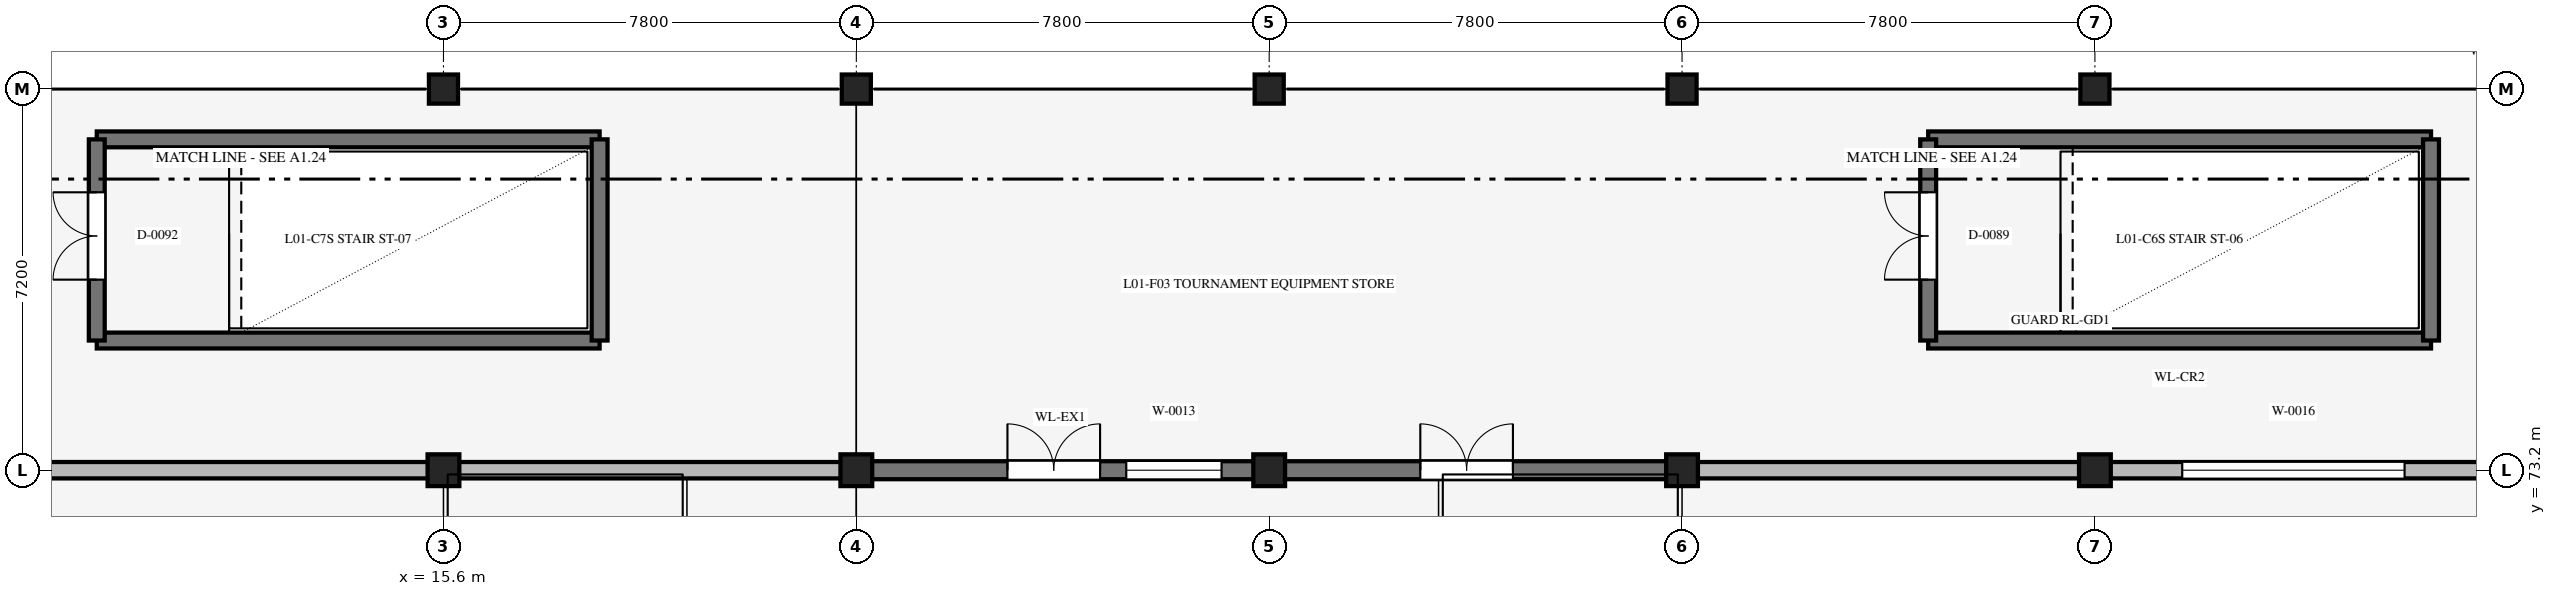
"""IFC4 building model, lengths in metres.
Left out: names, types, materials, properties, quantities, classifications, styles, units other than length and angle.
Written with IfcOpenShell. Run it as: python <this file> out.ifc"""

import sys

from ifc_helpers import new_model, si_unit, direction, frame, frame_2d, origin, origin_2d, place, context, subcontext, project, spatial, rectangle, extrude, element, fill, save


model = new_model("IFC4")
c1 = context("Model", 3, precision=1e-05, world=origin(), true_north=direction((0.0, 1.0)))
c2 = subcontext(c1, "Body", "Model", "MODEL_VIEW")
j1 = project(units=[si_unit("LENGTHUNIT", "METRE"), si_unit("PLANEANGLEUNIT", "RADIAN")], contexts=[c1])
p1 = place(None, origin())
s1 = spatial("IfcSite", under=j1, at=p1, CompositionType="ELEMENT")
p2 = place(p1, origin())
s2 = spatial("IfcBuilding", under=s1, at=p2, CompositionType="ELEMENT")
p3 = place(p2, frame((0.0, 0.0, 6.0)))
s3 = spatial("IfcBuildingStorey", under=s2, at=p3, CompositionType="ELEMENT", Elevation=6.0)
p4 = place(p3, frame((15.6, 73.2, 0.0), z_axis=(0.0, 0.0, 1.0), x_axis=(1.0, 0.0, 0.0)))
e1 = element("IfcColumn", 1, at=p4, inside=s3, PredefinedType="COLUMN", context=c2, shape_type="SweptSolid", body=[
    extrude(rectangle(XDim=0.6, YDim=0.6, at=origin_2d()), origin(), (0.0, 0.0, 1.0), 6.0),
])
p5 = place(p3, frame((15.6, 80.4, 0.0), z_axis=(0.0, 0.0, 1.0), x_axis=(1.0, 0.0, 0.0)))
e2 = element("IfcColumn", 2, at=p5, inside=s3, PredefinedType="COLUMN", context=c2, shape_type="SweptSolid", body=[
    extrude(rectangle(XDim=0.55, YDim=0.55, at=origin_2d()), origin(), (0.0, 0.0, 1.0), 6.0),
])
p6 = place(p3, frame((23.4, 73.2, 0.0), z_axis=(0.0, 0.0, 1.0), x_axis=(1.0, 0.0, 0.0)))
e3 = element("IfcColumn", 3, at=p6, inside=s3, PredefinedType="COLUMN", context=c2, shape_type="SweptSolid", body=[
    extrude(rectangle(XDim=0.6, YDim=0.6, at=origin_2d()), origin(), (0.0, 0.0, 1.0), 6.0),
])
p7 = place(p3, frame((23.4, 80.4, 0.0), z_axis=(0.0, 0.0, 1.0), x_axis=(1.0, 0.0, 0.0)))
e4 = element("IfcColumn", 4, at=p7, inside=s3, PredefinedType="COLUMN", context=c2, shape_type="SweptSolid", body=[
    extrude(rectangle(XDim=0.55, YDim=0.55, at=origin_2d()), origin(), (0.0, 0.0, 1.0), 6.0),
])
p8 = place(p3, frame((31.2, 73.2, 0.0), z_axis=(0.0, 0.0, 1.0), x_axis=(1.0, 0.0, 0.0)))
e5 = element("IfcColumn", 5, at=p8, inside=s3, PredefinedType="COLUMN", context=c2, shape_type="SweptSolid", body=[
    extrude(rectangle(XDim=0.6, YDim=0.6, at=origin_2d()), origin(), (0.0, 0.0, 1.0), 6.0),
])
p9 = place(p3, frame((31.2, 80.4, 0.0), z_axis=(0.0, 0.0, 1.0), x_axis=(1.0, 0.0, 0.0)))
e6 = element("IfcColumn", 6, at=p9, inside=s3, PredefinedType="COLUMN", context=c2, shape_type="SweptSolid", body=[
    extrude(rectangle(XDim=0.55, YDim=0.55, at=origin_2d()), origin(), (0.0, 0.0, 1.0), 6.0),
])
p10 = place(p3, frame((39.0, 73.2, 0.0), z_axis=(0.0, 0.0, 1.0), x_axis=(1.0, 0.0, 0.0)))
e7 = element("IfcColumn", 7, at=p10, inside=s3, PredefinedType="COLUMN", context=c2, shape_type="SweptSolid", body=[
    extrude(rectangle(XDim=0.6, YDim=0.6, at=origin_2d()), origin(), (0.0, 0.0, 1.0), 6.0),
])
p11 = place(p3, frame((39.0, 80.4, 0.0), z_axis=(0.0, 0.0, 1.0), x_axis=(1.0, 0.0, 0.0)))
e8 = element("IfcColumn", 8, at=p11, inside=s3, PredefinedType="COLUMN", context=c2, shape_type="SweptSolid", body=[
    extrude(rectangle(XDim=0.55, YDim=0.55, at=origin_2d()), origin(), (0.0, 0.0, 1.0), 6.0),
])
p12 = place(p3, frame((46.8, 73.2, 0.0), z_axis=(0.0, 0.0, 1.0), x_axis=(1.0, 0.0, 0.0)))
e9 = element("IfcColumn", 9, at=p12, inside=s3, PredefinedType="COLUMN", context=c2, shape_type="SweptSolid", body=[
    extrude(rectangle(XDim=0.6, YDim=0.6, at=origin_2d()), origin(), (0.0, 0.0, 1.0), 6.0),
])
p13 = place(p3, frame((46.8, 80.4, 0.0), z_axis=(0.0, 0.0, 1.0), x_axis=(1.0, 0.0, 0.0)))
e10 = element("IfcColumn", 10, at=p13, inside=s3, PredefinedType="COLUMN", context=c2, shape_type="SweptSolid", body=[
    extrude(rectangle(XDim=0.55, YDim=0.55, at=origin_2d()), origin(), (0.0, 0.0, 1.0), 6.0),
])
for number, where, z_axis, x_axis in (
    (11, (53.15, 75.65, 0.0), (0.0, 0.0, 1.0), (-1.0, 0.0, 0.0)),
    (12, (43.65, 79.45, 0.0), (0.0, 0.0, 1.0), (1.0, 0.0, 0.0)),
):
    element("IfcWall", number, at=place(p3, frame(where, z_axis=z_axis, x_axis=x_axis)), inside=s3, PredefinedType="SHEAR", context=c2, shape_type="SweptSolid", body=[
        extrude(rectangle(XDim=9.5, YDim=0.3, at=frame_2d((4.75, 0.0))), origin(), (0.0, 0.0, 1.0), 3.3),
    ])
p14 = place(p3, frame((43.65, 75.65, 0.0), z_axis=(0.0, 0.0, 1.0), x_axis=(0.0, 1.0, 0.0)))
e13 = element("IfcWall", 13, at=p14, inside=s3, PredefinedType="SHEAR", context=c2, shape_type="SweptSolid", body=[
    extrude(rectangle(XDim=3.8, YDim=0.3, at=frame_2d((1.9, 0.0))), origin(), (0.0, 0.0, 1.0), 3.3),
])
p15 = place(p14, frame((1.15, 0.0, 0.0)))
e14 = element("IfcOpeningElement", 14, at=p15, cuts=e13, PredefinedType="OPENING", context=c2, shape_type="SweptSolid", body=[
    extrude(rectangle(XDim=1.65, YDim=2.2, at=frame_2d((0.825, 1.1))), frame((0.0, 0.16, 0.0), z_axis=(0.0, -1.0, 0.0), x_axis=(1.0, 0.0, 0.0)), (0.0, 0.0, 1.0), 0.32),
])
p16 = place(p3, frame((53.15, 75.65, 0.0), z_axis=(0.0, 0.0, 1.0), x_axis=(0.0, 1.0, 0.0)))
e15 = element("IfcWall", 15, at=p16, inside=s3, PredefinedType="SHEAR", context=c2, shape_type="SweptSolid", body=[
    extrude(rectangle(XDim=3.8, YDim=0.3, at=frame_2d((1.9, 0.0))), origin(), (0.0, 0.0, 1.0), 3.3),
])
for number, where, z_axis, x_axis in (
    (16, (18.55, 75.65, 0.0), (0.0, 0.0, 1.0), (-1.0, 0.0, 0.0)),
    (17, (9.05, 79.45, 0.0), (0.0, 0.0, 1.0), (1.0, 0.0, 0.0)),
):
    element("IfcWall", number, at=place(p3, frame(where, z_axis=z_axis, x_axis=x_axis)), inside=s3, PredefinedType="SHEAR", context=c2, shape_type="SweptSolid", body=[
        extrude(rectangle(XDim=9.5, YDim=0.3, at=frame_2d((4.75, 0.0))), origin(), (0.0, 0.0, 1.0), 3.3),
    ])
p17 = place(p3, frame((9.05, 75.65, 0.0), z_axis=(0.0, 0.0, 1.0), x_axis=(0.0, 1.0, 0.0)))
e18 = element("IfcWall", 18, at=p17, inside=s3, PredefinedType="SHEAR", context=c2, shape_type="SweptSolid", body=[
    extrude(rectangle(XDim=3.8, YDim=0.3, at=frame_2d((1.9, 0.0))), origin(), (0.0, 0.0, 1.0), 3.3),
])
p18 = place(p17, frame((1.15, 0.0, 0.0)))
e19 = element("IfcOpeningElement", 19, at=p18, cuts=e18, PredefinedType="OPENING", context=c2, shape_type="SweptSolid", body=[
    extrude(rectangle(XDim=1.65, YDim=2.2, at=frame_2d((0.825, 1.1))), frame((0.0, 0.16, 0.0), z_axis=(0.0, -1.0, 0.0), x_axis=(1.0, 0.0, 0.0)), (0.0, 0.0, 1.0), 0.32),
])
p19 = place(p3, frame((18.55, 75.65, 0.0), z_axis=(0.0, 0.0, 1.0), x_axis=(0.0, 1.0, 0.0)))
e20 = element("IfcWall", 20, at=p19, inside=s3, PredefinedType="SHEAR", context=c2, shape_type="SweptSolid", body=[
    extrude(rectangle(XDim=3.8, YDim=0.3, at=frame_2d((1.9, 0.0))), origin(), (0.0, 0.0, 1.0), 3.3),
])
p20 = place(p3, frame((7.755, 73.2, 0.0), z_axis=(0.0, 0.0, 1.0), x_axis=(1.0, 0.0, 0.0)))
e21 = element("IfcWall", 21, at=p20, inside=s3, PredefinedType="STANDARD", context=c2, shape_type="SweptSolid", body=[
    extrude(rectangle(XDim=7.795, YDim=0.31, at=frame_2d((3.897, 0.0))), origin(), (0.0, 0.0, 1.0), 8.191),
])
p21 = place(p3, frame((15.555, 73.2, 0.0), z_axis=(0.0, 0.0, 1.0), x_axis=(1.0, 0.0, 0.0)))
e22 = element("IfcWall", 22, at=p21, inside=s3, PredefinedType="STANDARD", context=c2, shape_type="SweptSolid", body=[
    extrude(rectangle(XDim=7.795, YDim=0.31, at=frame_2d((3.897, 0.0))), origin(), (0.0, 0.0, 1.0), 5.475),
])
p22 = place(p3, frame((23.355, 73.2, 0.0), z_axis=(0.0, 0.0, 1.0), x_axis=(1.0, 0.0, 0.0)))
e23 = element("IfcWall", 23, at=p22, inside=s3, PredefinedType="STANDARD", context=c2, shape_type="SweptSolid", body=[
    extrude(rectangle(XDim=7.795, YDim=0.34, at=frame_2d((3.897, 0.0))), origin(), (0.0, 0.0, 1.0), 9.6),
])
p23 = place(p22, frame((2.9, 0.0, 0.0)))
e24 = element("IfcOpeningElement", 24, at=p23, cuts=e23, PredefinedType="OPENING", context=c2, shape_type="SweptSolid", body=[
    extrude(rectangle(XDim=1.75, YDim=2.4, at=frame_2d((0.875, 1.2))), frame((0.0, 0.18, 0.0), z_axis=(0.0, -1.0, 0.0), x_axis=(1.0, 0.0, 0.0)), (0.0, 0.0, 1.0), 0.36),
])
p24 = place(p22, frame((5.145, 0.0, 5.8)))
e25 = element("IfcOpeningElement", 25, at=p24, cuts=e23, PredefinedType="OPENING", context=c2, shape_type="SweptSolid", body=[
    extrude(rectangle(XDim=1.8, YDim=1.8, at=frame_2d((0.9, 0.9))), frame((0.0, 0.18, 0.0), z_axis=(0.0, -1.0, 0.0), x_axis=(1.0, 0.0, 0.0)), (0.0, 0.0, 1.0), 0.36),
])
p25 = place(p3, frame((31.155, 73.2, 0.0), z_axis=(0.0, 0.0, 1.0), x_axis=(1.0, 0.0, 0.0)))
e26 = element("IfcWall", 26, at=p25, inside=s3, PredefinedType="STANDARD", context=c2, shape_type="SweptSolid", body=[
    extrude(rectangle(XDim=7.795, YDim=0.34, at=frame_2d((3.897, 0.0))), origin(), (0.0, 0.0, 1.0), 9.6),
])
p26 = place(p25, frame((2.9, 0.0, 0.0)))
e27 = element("IfcOpeningElement", 27, at=p26, cuts=e26, PredefinedType="OPENING", context=c2, shape_type="SweptSolid", body=[
    extrude(rectangle(XDim=1.75, YDim=2.4, at=frame_2d((0.875, 1.2))), frame((0.0, 0.18, 0.0), z_axis=(0.0, -1.0, 0.0), x_axis=(1.0, 0.0, 0.0)), (0.0, 0.0, 1.0), 0.36),
])
p27 = place(p3, frame((38.955, 73.2, 0.0), z_axis=(0.0, 0.0, 1.0), x_axis=(1.0, 0.0, 0.0)))
e28 = element("IfcWall", 28, at=p27, inside=s3, PredefinedType="STANDARD", context=c2, shape_type="SweptSolid", body=[
    extrude(rectangle(XDim=7.795, YDim=0.31, at=frame_2d((3.897, 0.0))), origin(), (0.0, 0.0, 1.0), 8.191),
])
p28 = place(p3, frame((46.755, 73.2, 0.0), z_axis=(0.0, 0.0, 1.0), x_axis=(1.0, 0.0, 0.0)))
e29 = element("IfcWall", 29, at=p28, inside=s3, PredefinedType="STANDARD", context=c2, shape_type="SweptSolid", body=[
    extrude(rectangle(XDim=7.795, YDim=0.31, at=frame_2d((3.897, 0.0))), origin(), (0.0, 0.0, 1.0), 8.191),
])
p29 = place(p28, frame((1.695, 0.0, 6.2)))
e30 = element("IfcOpeningElement", 30, at=p29, cuts=e29, PredefinedType="OPENING", context=c2, shape_type="SweptSolid", body=[
    extrude(rectangle(XDim=4.2, YDim=1.6, at=frame_2d((2.1, 0.8))), frame((0.0, 0.165, 0.0), z_axis=(0.0, -1.0, 0.0), x_axis=(1.0, 0.0, 0.0)), (0.0, 0.0, 1.0), 0.33),
])
p30 = place(p23, origin())
e31 = element("IfcDoor", 31, at=p30, inside=s3, OperationType="DOUBLE_DOOR_SINGLE_SWING", PredefinedType="DOOR", context=c2, shape_type="SweptSolid", body=[
    extrude(rectangle(XDim=1.75, YDim=2.4, at=frame_2d((0.875, 1.2))), frame((0.0, 0.025, 0.0), z_axis=(0.0, -1.0, 0.0), x_axis=(1.0, 0.0, 0.0)), (0.0, 0.0, 1.0), 0.05),
])
fill(e24, e31)
p31 = place(p24, origin())
e32 = element("IfcWindow", 32, at=p31, inside=s3, PartitioningType="SINGLE_PANEL", PredefinedType="WINDOW", context=c2, shape_type="SweptSolid", body=[
    extrude(rectangle(XDim=1.8, YDim=1.8, at=frame_2d((0.9, 0.9))), frame((0.0, 0.03, 0.0), z_axis=(0.0, -1.0, 0.0), x_axis=(1.0, 0.0, 0.0)), (0.0, 0.0, 1.0), 0.06),
])
fill(e25, e32)
p32 = place(p26, origin())
e33 = element("IfcDoor", 33, at=p32, inside=s3, OperationType="DOUBLE_DOOR_SINGLE_SWING", PredefinedType="DOOR", context=c2, shape_type="SweptSolid", body=[
    extrude(rectangle(XDim=1.75, YDim=2.4, at=frame_2d((0.875, 1.2))), frame((0.0, 0.025, 0.0), z_axis=(0.0, -1.0, 0.0), x_axis=(1.0, 0.0, 0.0)), (0.0, 0.0, 1.0), 0.05),
])
fill(e27, e33)
p33 = place(p29, origin())
e34 = element("IfcWindow", 34, at=p33, inside=s3, PartitioningType="SINGLE_PANEL", PredefinedType="WINDOW", context=c2, shape_type="SweptSolid", body=[
    extrude(rectangle(XDim=4.2, YDim=1.6, at=frame_2d((2.1, 0.8))), frame((0.0, 0.03, 0.0), z_axis=(0.0, -1.0, 0.0), x_axis=(1.0, 0.0, 0.0)), (0.0, 0.0, 1.0), 0.06),
])
fill(e30, e34)
p34 = place(p15, origin())
e35 = element("IfcDoor", 35, at=p34, inside=s3, OperationType="DOUBLE_DOOR_SINGLE_SWING", PredefinedType="DOOR", context=c2, shape_type="SweptSolid", body=[
    extrude(rectangle(XDim=1.65, YDim=2.2, at=frame_2d((0.825, 1.1))), frame((0.0, 0.025, 0.0), z_axis=(0.0, -1.0, 0.0), x_axis=(1.0, 0.0, 0.0)), (0.0, 0.0, 1.0), 0.05),
])
fill(e14, e35)
p35 = place(p18, origin())
e36 = element("IfcDoor", 36, at=p35, inside=s3, OperationType="DOUBLE_DOOR_SINGLE_SWING", PredefinedType="DOOR", context=c2, shape_type="SweptSolid", body=[
    extrude(rectangle(XDim=1.65, YDim=2.2, at=frame_2d((0.825, 1.1))), frame((0.0, 0.025, 0.0), z_axis=(0.0, -1.0, 0.0), x_axis=(1.0, 0.0, 0.0)), (0.0, 0.0, 1.0), 0.05),
])
fill(e19, e36)
save(model, sys.argv[1])
